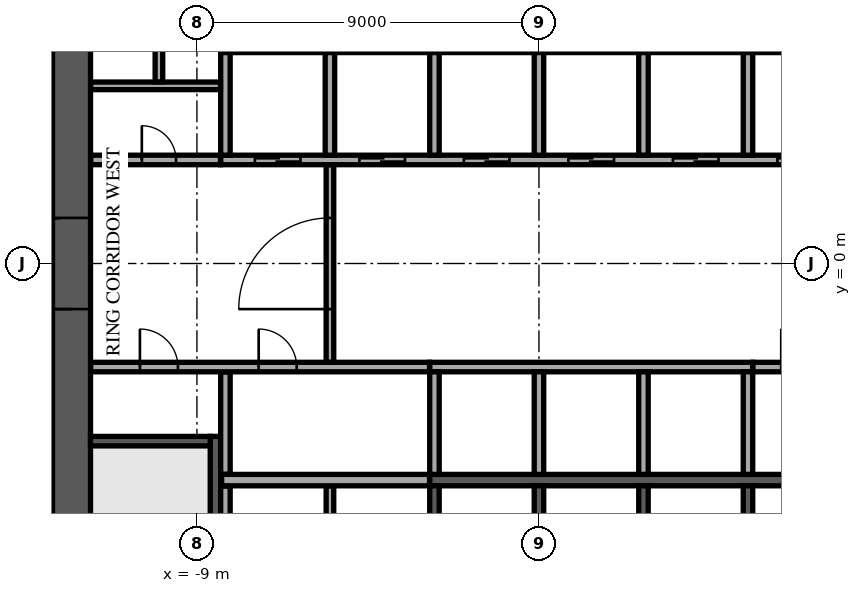
"""IFC4 building model, lengths in metres.
Left out: names, types, materials, properties, quantities, classifications, styles, units other than length and angle.
Written with IfcOpenShell. Run it as: python <this file> out.ifc"""

import sys

from ifc_helpers import new_model, si_unit, direction, frame, frame_2d, origin, place, context, subcontext, project, spatial, rectangle, extrude, element, fill, save


model = new_model("IFC4")
c1 = context("Model", 3, precision=1e-05, world=origin(), true_north=direction((0.0, 1.0)))
c2 = subcontext(c1, "Body", "Model", "MODEL_VIEW")
j1 = project(units=[si_unit("LENGTHUNIT", "METRE"), si_unit("PLANEANGLEUNIT", "RADIAN")], contexts=[c1])
p1 = place(None, origin())
s1 = spatial("IfcSite", under=j1, at=p1, CompositionType="ELEMENT")
p2 = place(p1, origin())
s2 = spatial("IfcBuilding", under=s1, at=p2, CompositionType="ELEMENT")
p3 = place(p2, frame((0.0, 0.0, 155.7)))
s3 = spatial("IfcBuildingStorey", under=s2, at=p3, CompositionType="ELEMENT", Elevation=155.7)
p4 = place(p3, frame((-12.3, -11.8, 0.0), z_axis=(0.0, 0.0, 1.0), x_axis=(0.0, 1.0, 0.0)))
e1 = element("IfcWall", 1, at=p4, inside=s3, PredefinedType="SHEAR", context=c2, shape_type="SweptSolid", body=[
    extrude(rectangle(XDim=23.6, YDim=1.0, at=frame_2d((11.8, 0.0))), origin(), (0.0, 0.0, 1.0), 3.6),
])
p5 = place(p4, frame((10.6, 0.0, 0.0)))
e2 = element("IfcOpeningElement", 2, at=p5, cuts=e1, PredefinedType="OPENING", context=c2, shape_type="SweptSolid", body=[
    extrude(rectangle(XDim=2.4, YDim=2.4, at=frame_2d((1.2, 1.2))), frame((0.0, 0.51, 0.0), z_axis=(0.0, -1.0, 0.0), x_axis=(1.0, 0.0, 0.0)), (0.0, 0.0, 1.0), 1.02),
])
p6 = place(p3, frame((-8.375, 5.7, 0.0), z_axis=(0.0, 0.0, 1.0), x_axis=(1.0, 0.0, 0.0)))
e3 = element("IfcWall", 3, at=p6, inside=s3, PredefinedType="SOLIDWALL", context=c2, shape_type="SweptSolid", body=[
    extrude(rectangle(XDim=16.75, YDim=0.3, at=frame_2d((8.375, 0.0))), origin(), (0.0, 0.0, 1.0), 3.6),
])
p7 = place(p3, frame((-2.875, -5.7, 0.0), z_axis=(0.0, 0.0, 1.0), x_axis=(1.0, 0.0, 0.0)))
e4 = element("IfcWall", 4, at=p7, inside=s3, PredefinedType="SOLIDWALL", context=c2, shape_type="SweptSolid", body=[
    extrude(rectangle(XDim=11.25, YDim=0.3, at=frame_2d((5.625, 0.0))), origin(), (0.0, 0.0, 1.0), 3.6),
])
p8 = place(p3, frame((-8.375, 2.725, 0.0), z_axis=(0.0, 0.0, 1.0), x_axis=(1.0, 0.0, 0.0)))
e5 = element("IfcWall", 5, at=p8, inside=s3, PredefinedType="SOLIDWALL", context=c2, shape_type="SweptSolid", body=[
    extrude(rectangle(XDim=16.75, YDim=0.25, at=frame_2d((8.375, 0.0))), origin(), (0.0, 0.0, 1.0), 3.6),
])
p9 = place(p8, frame((0.9, 0.0, 0.0)))
e6 = element("IfcOpeningElement", 6, at=p9, cuts=e5, PredefinedType="OPENING", context=c2, shape_type="SweptSolid", body=[
    extrude(rectangle(XDim=1.2, YDim=2.1, at=frame_2d((0.6, 1.05))), frame((0.0, 0.135, 0.0), z_axis=(0.0, -1.0, 0.0), x_axis=(1.0, 0.0, 0.0)), (0.0, 0.0, 1.0), 0.27),
])
p10 = place(p8, frame((3.65, 0.0, 0.0)))
e7 = element("IfcOpeningElement", 7, at=p10, cuts=e5, PredefinedType="OPENING", context=c2, shape_type="SweptSolid", body=[
    extrude(rectangle(XDim=1.2, YDim=2.1, at=frame_2d((0.6, 1.05))), frame((0.0, 0.135, 0.0), z_axis=(0.0, -1.0, 0.0), x_axis=(1.0, 0.0, 0.0)), (0.0, 0.0, 1.0), 0.27),
])
p11 = place(p8, frame((6.4, 0.0, 0.0)))
e8 = element("IfcOpeningElement", 8, at=p11, cuts=e5, PredefinedType="OPENING", context=c2, shape_type="SweptSolid", body=[
    extrude(rectangle(XDim=1.2, YDim=2.1, at=frame_2d((0.6, 1.05))), frame((0.0, 0.135, 0.0), z_axis=(0.0, -1.0, 0.0), x_axis=(1.0, 0.0, 0.0)), (0.0, 0.0, 1.0), 0.27),
])
p12 = place(p8, frame((9.15, 0.0, 0.0)))
e9 = element("IfcOpeningElement", 9, at=p12, cuts=e5, PredefinedType="OPENING", context=c2, shape_type="SweptSolid", body=[
    extrude(rectangle(XDim=1.2, YDim=2.1, at=frame_2d((0.6, 1.05))), frame((0.0, 0.135, 0.0), z_axis=(0.0, -1.0, 0.0), x_axis=(1.0, 0.0, 0.0)), (0.0, 0.0, 1.0), 0.27),
])
p13 = place(p8, frame((11.9, 0.0, 0.0)))
e10 = element("IfcOpeningElement", 10, at=p13, cuts=e5, PredefinedType="OPENING", context=c2, shape_type="SweptSolid", body=[
    extrude(rectangle(XDim=1.2, YDim=2.1, at=frame_2d((0.6, 1.05))), frame((0.0, 0.135, 0.0), z_axis=(0.0, -1.0, 0.0), x_axis=(1.0, 0.0, 0.0)), (0.0, 0.0, 1.0), 0.27),
])
p14 = place(p8, frame((14.65, 0.0, 0.0)))
e11 = element("IfcOpeningElement", 11, at=p14, cuts=e5, PredefinedType="OPENING", context=c2, shape_type="SweptSolid", body=[
    extrude(rectangle(XDim=1.2, YDim=2.1, at=frame_2d((0.6, 1.05))), frame((0.0, 0.135, 0.0), z_axis=(0.0, -1.0, 0.0), x_axis=(1.0, 0.0, 0.0)), (0.0, 0.0, 1.0), 0.27),
])
for number, where, z_axis, x_axis in (
    (12, (-8.25, 2.85, 0.0), (0.0, 0.0, 1.0), (0.0, 1.0, 0.0)),
    (13, (-5.5, 2.85, 0.0), (0.0, 0.0, 1.0), (0.0, 1.0, 0.0)),
    (14, (-2.75, 2.85, 0.0), (0.0, 0.0, 1.0), (0.0, 1.0, 0.0)),
    (15, (0.0, 2.85, 0.0), (0.0, 0.0, 1.0), (0.0, 1.0, 0.0)),
    (16, (2.75, 2.85, 0.0), (0.0, 0.0, 1.0), (0.0, 1.0, 0.0)),
    (17, (5.5, 2.85, 0.0), (0.0, 0.0, 1.0), (0.0, 1.0, 0.0)),
):
    element("IfcWall", number, at=place(p3, frame(where, z_axis=z_axis, x_axis=x_axis)), inside=s3, PredefinedType="SOLIDWALL", context=c2, shape_type="SweptSolid", body=[
        extrude(rectangle(XDim=2.7, YDim=0.25, at=frame_2d((1.35, 0.0))), origin(), (0.0, 0.0, 1.0), 3.6),
    ])
p15 = place(p3, frame((-2.875, -2.725, 0.0), z_axis=(0.0, 0.0, 1.0), x_axis=(1.0, 0.0, 0.0)))
e18 = element("IfcWall", 18, at=p15, inside=s3, PredefinedType="SOLIDWALL", context=c2, shape_type="SweptSolid", body=[
    extrude(rectangle(XDim=8.5, YDim=0.25, at=frame_2d((4.25, 0.0))), origin(), (0.0, 0.0, 1.0), 3.6),
])
for number, where, z_axis, x_axis in (
    (19, (-2.75, -5.55, 0.0), (0.0, 0.0, 1.0), (0.0, 1.0, 0.0)),
    (20, (0.0, -5.55, 0.0), (0.0, 0.0, 1.0), (0.0, 1.0, 0.0)),
    (21, (2.75, -5.55, 0.0), (0.0, 0.0, 1.0), (0.0, 1.0, 0.0)),
    (22, (5.5, -5.55, 0.0), (0.0, 0.0, 1.0), (0.0, 1.0, 0.0)),
    (23, (-2.75, -8.55, 0.0), (0.0, 0.0, 1.0), (0.0, 1.0, 0.0)),
    (24, (0.0, -8.55, 0.0), (0.0, 0.0, 1.0), (0.0, 1.0, 0.0)),
    (25, (2.75, -8.55, 0.0), (0.0, 0.0, 1.0), (0.0, 1.0, 0.0)),
    (26, (5.5, -8.55, 0.0), (0.0, 0.0, 1.0), (0.0, 1.0, 0.0)),
):
    element("IfcWall", number, at=place(p3, frame(where, z_axis=z_axis, x_axis=x_axis)), inside=s3, PredefinedType="SOLIDWALL", context=c2, shape_type="SweptSolid", body=[
        extrude(rectangle(XDim=2.7, YDim=0.25, at=frame_2d((1.35, 0.0))), origin(), (0.0, 0.0, 1.0), 3.6),
    ])
p16 = place(p3, frame((-8.512, -4.55, 0.0), z_axis=(0.0, 0.0, 1.0), x_axis=(0.0, -1.0, 0.0)))
e27 = element("IfcWall", 27, at=p16, inside=s3, PredefinedType="SOLIDWALL", context=c2, shape_type="SweptSolid", body=[
    extrude(rectangle(XDim=7.25, YDim=0.275, at=frame_2d((3.625, 0.0))), origin(), (0.0, 0.0, 1.0), 3.6),
])
p17 = place(p16, frame((6.0, 0.0, 0.0)))
e28 = element("IfcOpeningElement", 28, at=p17, cuts=e27, PredefinedType="OPENING", context=c2, shape_type="SweptSolid", body=[
    extrude(rectangle(XDim=1.0, YDim=2.1, at=frame_2d((0.5, 1.05))), frame((0.0, 0.147, 0.0), z_axis=(0.0, -1.0, 0.0), x_axis=(1.0, 0.0, 0.0)), (0.0, 0.0, 1.0), 0.295),
])
p18 = place(p3, frame((-8.65, -4.675, 0.0), z_axis=(0.0, 0.0, 1.0), x_axis=(-1.0, 0.0, 0.0)))
e29 = element("IfcWall", 29, at=p18, inside=s3, PredefinedType="SOLIDWALL", context=c2, shape_type="SweptSolid", body=[
    extrude(rectangle(XDim=3.15, YDim=0.25, at=frame_2d((1.575, 0.0))), origin(), (0.0, 0.0, 1.0), 3.6),
])
p19 = place(p3, frame((-8.25, -8.545, 0.0), z_axis=(0.0, 0.0, 1.0), x_axis=(0.0, 1.0, 0.0)))
e30 = element("IfcWall", 30, at=p19, inside=s3, PredefinedType="PARTITIONING", context=c2, shape_type="SweptSolid", body=[
    extrude(rectangle(XDim=2.69, YDim=0.25, at=frame_2d((1.345, 0.0))), origin(), (0.0, 0.0, 1.0), 3.6),
])
p20 = place(p3, frame((-5.5, -8.545, 0.0), z_axis=(0.0, 0.0, 1.0), x_axis=(0.0, 1.0, 0.0)))
e31 = element("IfcWall", 31, at=p20, inside=s3, PredefinedType="PARTITIONING", context=c2, shape_type="SweptSolid", body=[
    extrude(rectangle(XDim=2.69, YDim=0.2, at=frame_2d((1.345, 0.0))), origin(), (0.0, 0.0, 1.0), 3.6),
])
p21 = place(p3, frame((-8.35, -5.7, 0.0), z_axis=(0.0, 0.0, 1.0), x_axis=(1.0, 0.0, 0.0)))
e32 = element("IfcWall", 32, at=p21, inside=s3, PredefinedType="PARTITIONING", context=c2, shape_type="SweptSolid", body=[
    extrude(rectangle(XDim=5.47, YDim=0.3, at=frame_2d((2.735, 0.0))), origin(), (0.0, 0.0, 1.0), 3.6),
])
p22 = place(p3, frame((-8.25, -5.545, 0.0), z_axis=(0.0, 0.0, 1.0), x_axis=(0.0, 1.0, 0.0)))
e33 = element("IfcWall", 33, at=p22, inside=s3, PredefinedType="PARTITIONING", context=c2, shape_type="SweptSolid", body=[
    extrude(rectangle(XDim=2.69, YDim=0.25, at=frame_2d((1.345, 0.0))), origin(), (0.0, 0.0, 1.0), 3.6),
])
p23 = place(p3, frame((-11.795, -2.725, 0.0), z_axis=(0.0, 0.0, 1.0), x_axis=(1.0, 0.0, 0.0)))
e34 = element("IfcWall", 34, at=p23, inside=s3, PredefinedType="PARTITIONING", context=c2, shape_type="SweptSolid", body=[
    extrude(rectangle(XDim=8.915, YDim=0.25, at=frame_2d((4.458, 0.0))), origin(), (0.0, 0.0, 1.0), 3.6),
])
p24 = place(p23, frame((1.295, 0.0, 0.0)))
e35 = element("IfcOpeningElement", 35, at=p24, cuts=e34, PredefinedType="OPENING", context=c2, shape_type="SweptSolid", body=[
    extrude(rectangle(XDim=1.0, YDim=2.1, at=frame_2d((0.5, 1.05))), frame((0.0, 0.135, 0.0), z_axis=(0.0, -1.0, 0.0), x_axis=(1.0, 0.0, 0.0)), (0.0, 0.0, 1.0), 0.27),
])
p25 = place(p23, frame((4.42, 0.0, 0.0)))
e36 = element("IfcOpeningElement", 36, at=p25, cuts=e34, PredefinedType="OPENING", context=c2, shape_type="SweptSolid", body=[
    extrude(rectangle(XDim=1.0, YDim=2.1, at=frame_2d((0.5, 1.05))), frame((0.0, 0.135, 0.0), z_axis=(0.0, -1.0, 0.0), x_axis=(1.0, 0.0, 0.0)), (0.0, 0.0, 1.0), 0.27),
])
p26 = place(p3, frame((5.63, -2.725, 0.0), z_axis=(0.0, 0.0, 1.0), x_axis=(1.0, 0.0, 0.0)))
e37 = element("IfcWall", 37, at=p26, inside=s3, PredefinedType="PARTITIONING", context=c2, shape_type="SweptSolid", body=[
    extrude(rectangle(XDim=6.165, YDim=0.25, at=frame_2d((3.083, 0.0))), origin(), (0.0, 0.0, 1.0), 3.6),
])
p27 = place(p26, frame((0.745, 0.0, 0.0)))
e38 = element("IfcOpeningElement", 38, at=p27, cuts=e37, PredefinedType="OPENING", context=c2, shape_type="SweptSolid", body=[
    extrude(rectangle(XDim=1.0, YDim=2.1, at=frame_2d((0.5, 1.05))), frame((0.0, 0.135, 0.0), z_axis=(0.0, -1.0, 0.0), x_axis=(1.0, 0.0, 0.0)), (0.0, 0.0, 1.0), 0.27),
])
p28 = place(p26, frame((3.92, 0.0, 0.0)))
e39 = element("IfcOpeningElement", 39, at=p28, cuts=e37, PredefinedType="OPENING", context=c2, shape_type="SweptSolid", body=[
    extrude(rectangle(XDim=0.9, YDim=2.1, at=frame_2d((0.45, 1.05))), frame((0.0, 0.135, 0.0), z_axis=(0.0, -1.0, 0.0), x_axis=(1.0, 0.0, 0.0)), (0.0, 0.0, 1.0), 0.27),
])
p29 = place(p3, frame((-5.5, -2.595, 0.0), z_axis=(0.0, 0.0, 1.0), x_axis=(0.0, 1.0, 0.0)))
e40 = element("IfcWall", 40, at=p29, inside=s3, PredefinedType="PARTITIONING", context=c2, shape_type="SweptSolid", body=[
    extrude(rectangle(XDim=5.19, YDim=0.2, at=frame_2d((2.595, 0.0))), origin(), (0.0, 0.0, 1.0), 3.6),
])
p30 = place(p29, frame((1.395, 0.0, 0.0)))
e41 = element("IfcOpeningElement", 41, at=p30, cuts=e40, PredefinedType="OPENING", context=c2, shape_type="SweptSolid", body=[
    extrude(rectangle(XDim=2.4, YDim=2.4, at=frame_2d((1.2, 1.2))), frame((0.0, 0.11, 0.0), z_axis=(0.0, -1.0, 0.0), x_axis=(1.0, 0.0, 0.0)), (0.0, 0.0, 1.0), 0.22),
])
p31 = place(p3, frame((-11.795, 2.725, 0.0), z_axis=(0.0, 0.0, 1.0), x_axis=(1.0, 0.0, 0.0)))
e42 = element("IfcWall", 42, at=p31, inside=s3, PredefinedType="PARTITIONING", context=c2, shape_type="SweptSolid", body=[
    extrude(rectangle(XDim=3.415, YDim=0.25, at=frame_2d((1.708, 0.0))), origin(), (0.0, 0.0, 1.0), 3.6),
])
p32 = place(p31, frame((1.345, 0.0, 0.0)))
e43 = element("IfcOpeningElement", 43, at=p32, cuts=e42, PredefinedType="OPENING", context=c2, shape_type="SweptSolid", body=[
    extrude(rectangle(XDim=0.9, YDim=2.1, at=frame_2d((0.45, 1.05))), frame((0.0, 0.135, 0.0), z_axis=(0.0, -1.0, 0.0), x_axis=(1.0, 0.0, 0.0)), (0.0, 0.0, 1.0), 0.27),
])
p33 = place(p3, frame((-11.795, 4.675, 0.0), z_axis=(0.0, 0.0, 1.0), x_axis=(1.0, 0.0, 0.0)))
e44 = element("IfcWall", 44, at=p33, inside=s3, PredefinedType="PARTITIONING", context=c2, shape_type="SweptSolid", body=[
    extrude(rectangle(XDim=3.415, YDim=0.2, at=frame_2d((1.708, 0.0))), origin(), (0.0, 0.0, 1.0), 3.6),
])
p34 = place(p3, frame((-10.0, 4.78, 0.0), z_axis=(0.0, 0.0, 1.0), x_axis=(0.0, 1.0, 0.0)))
e45 = element("IfcWall", 45, at=p34, inside=s3, PredefinedType="PARTITIONING", context=c2, shape_type="SweptSolid", body=[
    extrude(rectangle(XDim=7.015, YDim=0.2, at=frame_2d((3.507, 0.0))), origin(), (0.0, 0.0, 1.0), 3.6),
])
p35 = place(p34, frame((2.92, 0.0, 0.0)))
e46 = element("IfcOpeningElement", 46, at=p35, cuts=e45, PredefinedType="OPENING", context=c2, shape_type="SweptSolid", body=[
    extrude(rectangle(XDim=1.0, YDim=2.1, at=frame_2d((0.5, 1.05))), frame((0.0, 0.11, 0.0), z_axis=(0.0, -1.0, 0.0), x_axis=(1.0, 0.0, 0.0)), (0.0, 0.0, 1.0), 0.22),
])
p36 = place(p3, frame((-25.271, -0.744, 0.0), z_axis=(0.0, 0.0, 1.0), x_axis=(0.544659433471, -0.838657320681, 0.0)))
e47 = element("IfcWall", 47, at=p36, inside=s3, PredefinedType="PARTITIONING", context=c2, shape_type="SweptSolid", body=[
    extrude(rectangle(XDim=26.354, YDim=0.15, at=frame_2d((13.177, 0.0))), origin(), (0.0, 0.0, 1.0), 3.15),
])
p37 = place(p36, frame((13.388, 0.0, 0.0)))
e48 = element("IfcOpeningElement", 48, at=p37, cuts=e47, PredefinedType="OPENING", context=c2, shape_type="SweptSolid", body=[
    extrude(rectangle(XDim=1.0, YDim=2.1, at=frame_2d((0.5, 1.05))), frame((0.0, 0.085, 0.0), z_axis=(0.0, -1.0, 0.0), x_axis=(1.0, 0.0, 0.0)), (0.0, 0.0, 1.0), 0.17),
])
p38 = place(p36, frame((21.137, 0.0, 0.0)))
e49 = element("IfcOpeningElement", 49, at=p38, cuts=e47, PredefinedType="OPENING", context=c2, shape_type="SweptSolid", body=[
    extrude(rectangle(XDim=1.8, YDim=2.1, at=frame_2d((0.9, 1.05))), frame((0.0, 0.085, 0.0), z_axis=(0.0, -1.0, 0.0), x_axis=(1.0, 0.0, 0.0)), (0.0, 0.0, 1.0), 0.17),
])
p39 = place(p3, frame((-4.376, -25.496, 0.0), z_axis=(0.0, 0.0, 1.0), x_axis=(0.838659454634, 0.544656147631, 0.0)))
e50 = element("IfcWall", 50, at=p39, inside=s3, PredefinedType="PARTITIONING", context=c2, shape_type="SweptSolid", body=[
    extrude(rectangle(XDim=35.188, YDim=0.15, at=frame_2d((17.594, 0.0))), origin(), (0.0, 0.0, 1.0), 3.15),
])
p40 = place(p39, frame((2.55, 0.0, 0.0)))
e51 = element("IfcOpeningElement", 51, at=p40, cuts=e50, PredefinedType="OPENING", context=c2, shape_type="SweptSolid", body=[
    extrude(rectangle(XDim=1.0, YDim=2.1, at=frame_2d((0.5, 1.05))), frame((0.0, 0.085, 0.0), z_axis=(0.0, -1.0, 0.0), x_axis=(1.0, 0.0, 0.0)), (0.0, 0.0, 1.0), 0.17),
])
p41 = place(p39, frame((12.126, 0.0, 0.0)))
e52 = element("IfcOpeningElement", 52, at=p41, cuts=e50, PredefinedType="OPENING", context=c2, shape_type="SweptSolid", body=[
    extrude(rectangle(XDim=1.0, YDim=2.1, at=frame_2d((0.5, 1.05))), frame((0.0, 0.085, 0.0), z_axis=(0.0, -1.0, 0.0), x_axis=(1.0, 0.0, 0.0)), (0.0, 0.0, 1.0), 0.17),
])
p42 = place(p39, frame((25.759, 0.0, 0.0)))
e53 = element("IfcOpeningElement", 53, at=p42, cuts=e50, PredefinedType="OPENING", context=c2, shape_type="SweptSolid", body=[
    extrude(rectangle(XDim=1.0, YDim=2.1, at=frame_2d((0.5, 1.05))), frame((0.0, 0.085, 0.0), z_axis=(0.0, -1.0, 0.0), x_axis=(1.0, 0.0, 0.0)), (0.0, 0.0, 1.0), 0.17),
])
p43 = place(p5, origin())
e54 = element("IfcDoor", 54, at=p43, inside=s3, OperationType="SINGLE_SWING_LEFT", PredefinedType="DOOR", context=c2, shape_type="SweptSolid", body=[
    extrude(rectangle(XDim=2.4, YDim=2.4, at=frame_2d((1.2, 1.2))), frame((0.0, 0.025, 0.0), z_axis=(0.0, -1.0, 0.0), x_axis=(1.0, 0.0, 0.0)), (0.0, 0.0, 1.0), 0.05),
])
fill(e2, e54)
p44 = place(p9, origin())
e55 = element("IfcDoor", 55, at=p44, inside=s3, OperationType="DOUBLE_DOOR_SLIDING", PredefinedType="DOOR", context=c2, shape_type="SweptSolid", body=[
    extrude(rectangle(XDim=1.2, YDim=2.1, at=frame_2d((0.6, 1.05))), frame((0.0, 0.025, 0.0), z_axis=(0.0, -1.0, 0.0), x_axis=(1.0, 0.0, 0.0)), (0.0, 0.0, 1.0), 0.05),
])
fill(e6, e55)
p45 = place(p10, origin())
e56 = element("IfcDoor", 56, at=p45, inside=s3, OperationType="DOUBLE_DOOR_SLIDING", PredefinedType="DOOR", context=c2, shape_type="SweptSolid", body=[
    extrude(rectangle(XDim=1.2, YDim=2.1, at=frame_2d((0.6, 1.05))), frame((0.0, 0.025, 0.0), z_axis=(0.0, -1.0, 0.0), x_axis=(1.0, 0.0, 0.0)), (0.0, 0.0, 1.0), 0.05),
])
fill(e7, e56)
p46 = place(p11, origin())
e57 = element("IfcDoor", 57, at=p46, inside=s3, OperationType="DOUBLE_DOOR_SLIDING", PredefinedType="DOOR", context=c2, shape_type="SweptSolid", body=[
    extrude(rectangle(XDim=1.2, YDim=2.1, at=frame_2d((0.6, 1.05))), frame((0.0, 0.025, 0.0), z_axis=(0.0, -1.0, 0.0), x_axis=(1.0, 0.0, 0.0)), (0.0, 0.0, 1.0), 0.05),
])
fill(e8, e57)
p47 = place(p12, origin())
e58 = element("IfcDoor", 58, at=p47, inside=s3, OperationType="DOUBLE_DOOR_SLIDING", PredefinedType="DOOR", context=c2, shape_type="SweptSolid", body=[
    extrude(rectangle(XDim=1.2, YDim=2.1, at=frame_2d((0.6, 1.05))), frame((0.0, 0.025, 0.0), z_axis=(0.0, -1.0, 0.0), x_axis=(1.0, 0.0, 0.0)), (0.0, 0.0, 1.0), 0.05),
])
fill(e9, e58)
p48 = place(p13, origin())
e59 = element("IfcDoor", 59, at=p48, inside=s3, OperationType="DOUBLE_DOOR_SLIDING", PredefinedType="DOOR", context=c2, shape_type="SweptSolid", body=[
    extrude(rectangle(XDim=1.2, YDim=2.1, at=frame_2d((0.6, 1.05))), frame((0.0, 0.025, 0.0), z_axis=(0.0, -1.0, 0.0), x_axis=(1.0, 0.0, 0.0)), (0.0, 0.0, 1.0), 0.05),
])
fill(e10, e59)
p49 = place(p14, origin())
e60 = element("IfcDoor", 60, at=p49, inside=s3, OperationType="DOUBLE_DOOR_SLIDING", PredefinedType="DOOR", context=c2, shape_type="SweptSolid", body=[
    extrude(rectangle(XDim=1.2, YDim=2.1, at=frame_2d((0.6, 1.05))), frame((0.0, 0.025, 0.0), z_axis=(0.0, -1.0, 0.0), x_axis=(1.0, 0.0, 0.0)), (0.0, 0.0, 1.0), 0.05),
])
fill(e11, e60)
p50 = place(p24, origin())
e61 = element("IfcDoor", 61, at=p50, inside=s3, OperationType="SINGLE_SWING_LEFT", PredefinedType="DOOR", context=c2, shape_type="SweptSolid", body=[
    extrude(rectangle(XDim=1.0, YDim=2.1, at=frame_2d((0.5, 1.05))), frame((0.0, 0.025, 0.0), z_axis=(0.0, -1.0, 0.0), x_axis=(1.0, 0.0, 0.0)), (0.0, 0.0, 1.0), 0.05),
])
fill(e35, e61)
p51 = place(p32, origin())
e62 = element("IfcDoor", 62, at=p51, inside=s3, OperationType="SINGLE_SWING_LEFT", PredefinedType="DOOR", context=c2, shape_type="SweptSolid", body=[
    extrude(rectangle(XDim=0.9, YDim=2.1, at=frame_2d((0.45, 1.05))), frame((0.0, 0.025, 0.0), z_axis=(0.0, -1.0, 0.0), x_axis=(1.0, 0.0, 0.0)), (0.0, 0.0, 1.0), 0.05),
])
fill(e43, e62)
p52 = place(p25, origin())
e63 = element("IfcDoor", 63, at=p52, inside=s3, OperationType="SINGLE_SWING_LEFT", PredefinedType="DOOR", context=c2, shape_type="SweptSolid", body=[
    extrude(rectangle(XDim=1.0, YDim=2.1, at=frame_2d((0.5, 1.05))), frame((0.0, 0.025, 0.0), z_axis=(0.0, -1.0, 0.0), x_axis=(1.0, 0.0, 0.0)), (0.0, 0.0, 1.0), 0.05),
])
fill(e36, e63)
p53 = place(p30, origin())
e64 = element("IfcDoor", 64, at=p53, inside=s3, OperationType="SINGLE_SWING_LEFT", PredefinedType="DOOR", context=c2, shape_type="SweptSolid", body=[
    extrude(rectangle(XDim=2.4, YDim=2.4, at=frame_2d((1.2, 1.2))), frame((0.0, 0.025, 0.0), z_axis=(0.0, -1.0, 0.0), x_axis=(1.0, 0.0, 0.0)), (0.0, 0.0, 1.0), 0.05),
])
fill(e41, e64)
save(model, sys.argv[1])
